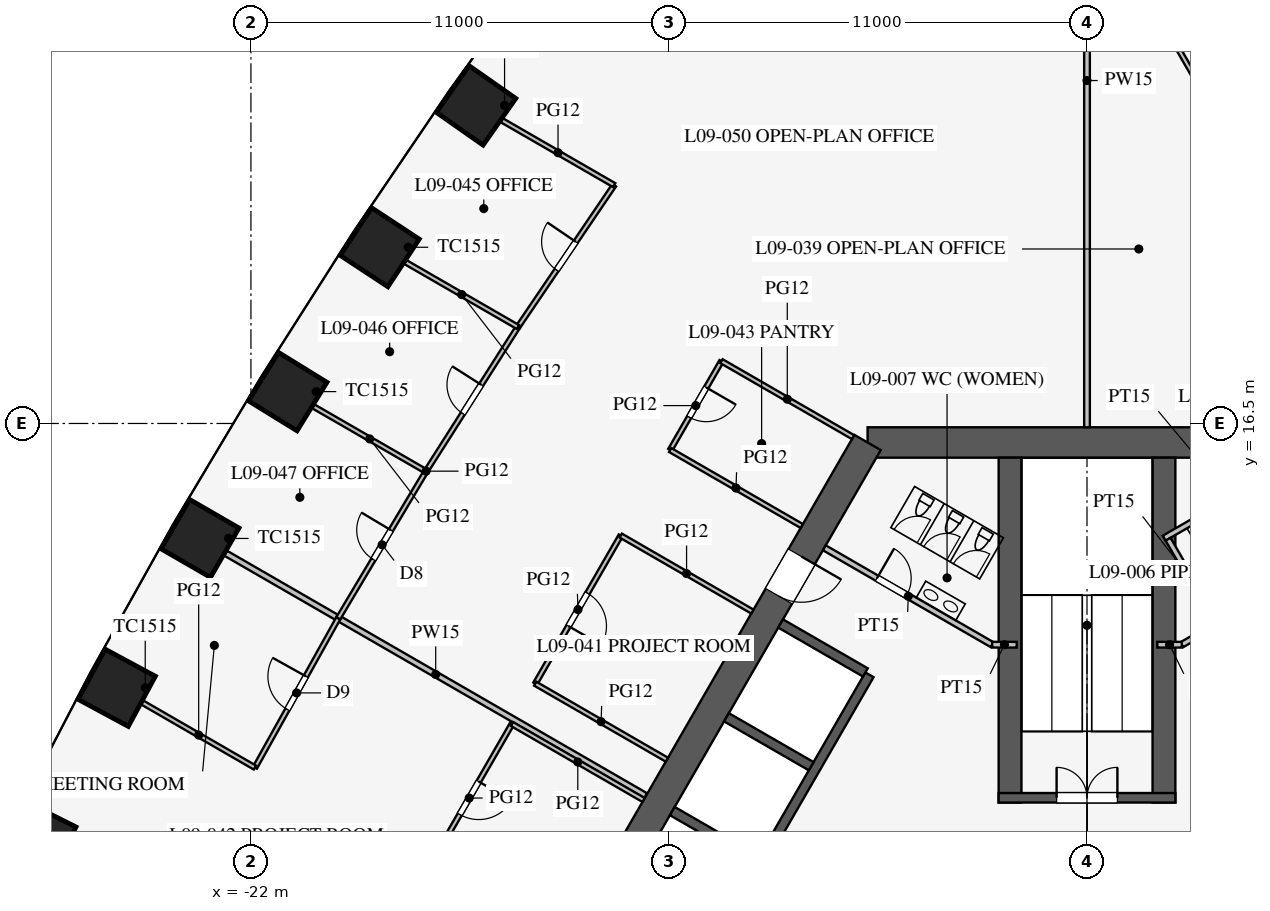
"""IFC4 building model, lengths in metres.
Left out: names, types, materials, properties, quantities, classifications, styles, units other than length and angle.
Written with IfcOpenShell. Run it as: python <this file> out.ifc"""

import sys

from ifc_helpers import new_model, si_unit, direction, frame, frame_2d, origin, origin_2d, place, context, subcontext, project, spatial, rectangle, extrude, element, fill, save


model = new_model("IFC4")
c1 = context("Model", 3, precision=1e-05, world=origin(), true_north=direction((0.0, 1.0)))
c2 = subcontext(c1, "Body", "Model", "MODEL_VIEW")
j1 = project(units=[si_unit("LENGTHUNIT", "METRE"), si_unit("PLANEANGLEUNIT", "RADIAN")], contexts=[c1])
p1 = place(None, origin())
s1 = spatial("IfcSite", under=j1, at=p1, CompositionType="ELEMENT")
p2 = place(p1, origin())
s2 = spatial("IfcBuilding", under=s1, at=p2, CompositionType="ELEMENT")
p3 = place(p2, frame((0.0, 0.0, 41.7)))
s3 = spatial("IfcBuildingStorey", under=s2, at=p3, CompositionType="ELEMENT", Elevation=41.7)
for number, where, z_axis, x_axis in (
    (1, (-16.076, 24.87, 0.0), (0.0, 0.0, 1.0), (-0.574, -0.819, 0.0)),
    (2, (-18.611, 21.137, 0.0), (0.0, 0.0, 1.0), (-0.549, -0.836, 0.0)),
    (3, (-21.031, 17.339, 0.0), (0.0, 0.0, 1.0), (-0.525, -0.851, 0.0)),
    (4, (-23.338, 13.474, 0.0), (0.0, 0.0, 1.0), (-0.5, -0.866, 0.0)),
    (5, (-25.531, 9.544, 0.0), (0.0, 0.0, 1.0), (-0.475, -0.88, 0.0)),
    (6, (-27.611, 5.549, 0.0), (0.0, 0.0, 1.0), (-0.449, -0.894, 0.0)),
):
    element("IfcColumn", number, at=place(p3, frame(where, z_axis=z_axis, x_axis=x_axis)), inside=s3, PredefinedType="COLUMN", context=c2, shape_type="SweptSolid", body=[
        extrude(rectangle(XDim=1.5, YDim=1.5, at=origin_2d()), origin(), (0.0, 0.0, 1.0), 4.2),
    ])
p4 = place(p3, frame((5.773, 16.0, 0.0), z_axis=(0.0, 0.0, 1.0), x_axis=(-1.0, 0.0, 0.0)))
e7 = element("IfcWall", 7, at=p4, inside=s3, PredefinedType="SHEAR", context=c2, shape_type="SweptSolid", body=[
    extrude(rectangle(XDim=11.547, YDim=0.8, at=frame_2d((5.773, 0.0))), origin(), (0.0, 0.0, 1.0), 4.2),
])
p5 = place(p3, frame((-5.773, 16.0, 0.0), z_axis=(0.0, 0.0, 1.0), x_axis=(-0.500002442456, -0.866023993627, 0.0)))
e8 = element("IfcWall", 8, at=p5, inside=s3, PredefinedType="SHEAR", context=c2, shape_type="SweptSolid", body=[
    extrude(rectangle(XDim=21.939, YDim=0.8, at=frame_2d((10.97, 0.0))), origin(), (0.0, 0.0, 1.0), 4.2),
])
p6 = place(p5, frame((17.27, 0.0, 0.0)))
e9 = element("IfcOpeningElement", 9, at=p6, cuts=e8, PredefinedType="OPENING", context=c2, shape_type="SweptSolid", body=[
    extrude(rectangle(XDim=1.2, YDim=2.1, at=frame_2d((0.6, 1.05))), frame((0.0, 0.41, 0.0), z_axis=(0.0, -1.0, 0.0), x_axis=(1.0, 0.0, 0.0)), (0.0, 0.0, 1.0), 0.82),
])
p7 = place(p5, frame((3.47, 0.0, 0.0)))
e10 = element("IfcOpeningElement", 10, at=p7, cuts=e8, PredefinedType="OPENING", context=c2, shape_type="SweptSolid", body=[
    extrude(rectangle(XDim=1.2, YDim=2.1, at=frame_2d((0.6, 1.05))), frame((0.0, 0.41, 0.0), z_axis=(0.0, -1.0, 0.0), x_axis=(1.0, 0.0, 0.0)), (0.0, 0.0, 1.0), 0.82),
])
p8 = place(p3, frame((-5.724, 9.886, 0.0), z_axis=(0.0, 0.0, 1.0), x_axis=(-0.500001763848, -0.866024385424, 0.0)))
e11 = element("IfcWall", 11, at=p8, inside=s3, PredefinedType="SHEAR", context=c2, shape_type="SweptSolid", body=[
    extrude(rectangle(XDim=11.4, YDim=0.25, at=frame_2d((5.7, 0.0))), origin(), (0.0, 0.0, 1.0), 4.2),
])
p9 = place(p8, frame((6.525, 0.0, 0.0)))
e12 = element("IfcOpeningElement", 12, at=p9, cuts=e11, PredefinedType="OPENING", context=c2, shape_type="SweptSolid", body=[
    extrude(rectangle(XDim=1.2, YDim=2.2, at=frame_2d((0.6, 1.1))), frame((0.0, 0.135, 0.0), z_axis=(0.0, -1.0, 0.0), x_axis=(1.0, 0.0, 0.0)), (0.0, 0.0, 1.0), 0.27),
])
p10 = place(p8, frame((9.375, 0.0, 0.0)))
e13 = element("IfcOpeningElement", 13, at=p10, cuts=e11, PredefinedType="OPENING", context=c2, shape_type="SweptSolid", body=[
    extrude(rectangle(XDim=1.2, YDim=2.2, at=frame_2d((0.6, 1.1))), frame((0.0, 0.135, 0.0), z_axis=(0.0, -1.0, 0.0), x_axis=(1.0, 0.0, 0.0)), (0.0, 0.0, 1.0), 0.27),
])
p11 = place(p3, frame((-5.832, 9.949, 0.0), z_axis=(0.0, 0.0, 1.0), x_axis=(-0.866029291668, 0.499993265928, 0.0)))
e14 = element("IfcWall", 14, at=p11, inside=s3, PredefinedType="SHEAR", context=c2, shape_type="SweptSolid", body=[
    extrude(rectangle(XDim=2.575, YDim=0.25, at=frame_2d((1.288, 0.0))), origin(), (0.0, 0.0, 1.0), 4.2),
])
for number, where, z_axis, x_axis in (
    (15, (-7.257, 7.481, 0.0), (0.0, 0.0, 1.0), (-0.866, 0.5, 0.0)),
    (16, (-8.682, 5.012, 0.0), (0.0, 0.0, 1.0), (-0.866, 0.5, 0.0)),
):
    element("IfcWall", number, at=place(p3, frame(where, z_axis=z_axis, x_axis=x_axis)), inside=s3, PredefinedType="SHEAR", context=c2, shape_type="SweptSolid", body=[
        extrude(rectangle(XDim=2.575, YDim=0.25, at=frame_2d((1.288, 0.0))), origin(), (0.0, 0.0, 1.0), 4.2),
    ])
for number, where, z_axis, x_axis in (
    (17, (2.025, 6.525, 0.0), (0.0, 0.0, 1.0), (0.0, 1.0, 0.0)),
    (18, (-2.025, 6.525, 0.0), (0.0, 0.0, 1.0), (0.0, 1.0, 0.0)),
):
    element("IfcWall", number, at=place(p3, frame(where, z_axis=z_axis, x_axis=x_axis)), inside=s3, PredefinedType="SHEAR", context=c2, shape_type="SweptSolid", body=[
        extrude(rectangle(XDim=9.075, YDim=0.6, at=frame_2d((4.538, 0.0))), origin(), (0.0, 0.0, 1.0), 4.2),
    ])
p12 = place(p3, frame((2.325, 6.65, 0.0), z_axis=(0.0, 0.0, 1.0), x_axis=(-1.0, 0.0, 0.0)))
e19 = element("IfcWall", 19, at=p12, inside=s3, PredefinedType="SHEAR", context=c2, shape_type="SweptSolid", body=[
    extrude(rectangle(XDim=4.65, YDim=0.25, at=frame_2d((2.325, 0.0))), origin(), (0.0, 0.0, 1.0), 4.2),
])
p13 = place(p12, frame((1.525, 0.0, 0.0)))
e20 = element("IfcOpeningElement", 20, at=p13, cuts=e19, PredefinedType="OPENING", context=c2, shape_type="SweptSolid", body=[
    extrude(rectangle(XDim=1.6, YDim=2.1, at=frame_2d((0.8, 1.05))), frame((0.0, 0.135, 0.0), z_axis=(0.0, -1.0, 0.0), x_axis=(1.0, 0.0, 0.0)), (0.0, 0.0, 1.0), 0.27),
])
p14 = place(p3, frame((2.495, 10.678, 0.0), z_axis=(0.0, 0.0, 1.0), x_axis=(0.86602216432, 0.500005610874, 0.0)))
e21 = element("IfcWall", 21, at=p14, inside=s3, PredefinedType="PARTITIONING", context=c2, shape_type="SweptSolid", body=[
    extrude(rectangle(XDim=5.1, YDim=0.15, at=frame_2d((2.55, 0.0))), origin(), (0.0, 0.0, 1.0), 4.0),
])
p15 = place(p14, frame((1.3, 0.0, 0.0)))
e22 = element("IfcOpeningElement", 22, at=p15, cuts=e21, PredefinedType="OPENING", context=c2, shape_type="SweptSolid", body=[
    extrude(rectangle(XDim=0.9, YDim=2.1, at=frame_2d((0.45, 1.05))), frame((0.0, 0.085, 0.0), z_axis=(0.0, -1.0, 0.0), x_axis=(1.0, 0.0, 0.0)), (0.0, 0.0, 1.0), 0.17),
])
p16 = place(p3, frame((-2.495, 10.678, 0.0), z_axis=(0.0, 0.0, 1.0), x_axis=(-0.86602216432, 0.500005610874, 0.0)))
e23 = element("IfcWall", 23, at=p16, inside=s3, PredefinedType="PARTITIONING", context=c2, shape_type="SweptSolid", body=[
    extrude(rectangle(XDim=5.1, YDim=0.15, at=frame_2d((2.55, 0.0))), origin(), (0.0, 0.0, 1.0), 4.0),
])
p17 = place(p16, frame((2.6, 0.0, 0.0)))
e24 = element("IfcOpeningElement", 24, at=p17, cuts=e23, PredefinedType="OPENING", context=c2, shape_type="SweptSolid", body=[
    extrude(rectangle(XDim=0.9, YDim=2.1, at=frame_2d((0.45, 1.05))), frame((0.0, 0.085, 0.0), z_axis=(0.0, -1.0, 0.0), x_axis=(1.0, 0.0, 0.0)), (0.0, 0.0, 1.0), 0.17),
])
for number, where, z_axis, x_axis in (
    (25, (2.495, 10.678, 0.0), (0.0, 0.0, 1.0), (-1.0, 0.0, 0.0)),
    (26, (-2.495, 10.678, 0.0), (0.0, 0.0, 1.0), (1.0, 0.0, 0.0)),
):
    element("IfcWall", number, at=place(p3, frame(where, z_axis=z_axis, x_axis=x_axis)), inside=s3, PredefinedType="PARTITIONING", context=c2, shape_type="SweptSolid", body=[
        extrude(rectangle(XDim=0.645, YDim=0.15, at=frame_2d((0.323, 0.0))), origin(), (0.0, 0.0, 1.0), 4.0),
    ])
p18 = place(p3, frame((2.031, 13.482, 0.0), z_axis=(0.0, 0.0, 1.0), x_axis=(0.866050731258, 0.499956128963, 0.0)))
e27 = element("IfcWall", 27, at=p18, inside=s3, PredefinedType="PARTITIONING", context=c2, shape_type="SweptSolid", body=[
    extrude(rectangle(XDim=4.1, YDim=0.15, at=frame_2d((2.05, 0.0))), origin(), (0.0, 0.0, 1.0), 4.0),
])
p19 = place(p3, frame((3.389, 11.281, 0.0), z_axis=(0.0, 0.0, 1.0), x_axis=(-0.499989096993, 0.866031698547, 0.0)))
e28 = element("IfcWall", 28, at=p19, inside=s3, PredefinedType="PARTITIONING", context=c2, shape_type="SweptSolid", body=[
    extrude(rectangle(XDim=2.51, YDim=0.15, at=frame_2d((1.255, 0.0))), origin(), (0.0, 0.0, 1.0), 4.0),
])
p20 = place(p3, frame((0.0, 16.4, 0.0), z_axis=(0.0, 0.0, 1.0), x_axis=(0.0, 1.0, 0.0)))
e29 = element("IfcWall", 29, at=p20, inside=s3, PredefinedType="PARTITIONING", context=c2, shape_type="SweptSolid", body=[
    extrude(rectangle(XDim=18.25, YDim=0.15, at=frame_2d((9.125, 0.0))), origin(), (0.0, 0.0, 1.0), 2.3),
])
p21 = place(p3, frame((26.415, -15.231, 0.0), z_axis=(0.0, 0.0, 1.0), x_axis=(-0.50000091641, 0.866024874695, 0.0)))
e30 = element("IfcWall", 30, at=p21, inside=s3, PredefinedType="PARTITIONING", context=c2, shape_type="SweptSolid", body=[
    extrude(rectangle(XDim=52.796, YDim=0.12, at=frame_2d((26.398, 0.0))), origin(), (0.0, 0.0, 1.0), 2.9),
])
p22 = place(p21, frame((10.2, 0.0, 0.15)))
e31 = element("IfcOpeningElement", 31, at=p22, cuts=e30, PredefinedType="OPENING", context=c2, shape_type="SweptSolid", body=[
    extrude(rectangle(XDim=1.8, YDim=2.1, at=frame_2d((0.9, 1.05))), frame((0.0, 0.07, 0.0), z_axis=(0.0, -1.0, 0.0), x_axis=(1.0, 0.0, 0.0)), (0.0, 0.0, 1.0), 0.14),
])
p23 = place(p21, frame((40.8, 0.0, 0.15)))
e32 = element("IfcOpeningElement", 32, at=p23, cuts=e30, PredefinedType="OPENING", context=c2, shape_type="SweptSolid", body=[
    extrude(rectangle(XDim=1.8, YDim=2.1, at=frame_2d((0.9, 1.05))), frame((0.0, 0.07, 0.0), z_axis=(0.0, -1.0, 0.0), x_axis=(1.0, 0.0, 0.0)), (0.0, 0.0, 1.0), 0.14),
])
p24 = place(p3, frame((-11.613, 6.705, 0.0), z_axis=(0.0, 0.0, 1.0), x_axis=(-0.86602785495, 0.499995754432, 0.0)))
e33 = element("IfcWall", 33, at=p24, inside=s3, PredefinedType="PARTITIONING", context=c2, shape_type="SweptSolid", body=[
    extrude(rectangle(XDim=12.759, YDim=0.15, at=frame_2d((6.379, 0.0))), origin(), (0.0, 0.0, 1.0), 3.2),
])
p25 = place(p3, frame((-15.131, 8.592, 0.0), z_axis=(0.0, 0.0, 1.0), x_axis=(-0.499990139034, -0.866031096941, 0.0)))
e34 = element("IfcWall", 34, at=p25, inside=s3, PredefinedType="PARTITIONING", context=c2, shape_type="SweptSolid", body=[
    extrude(rectangle(XDim=4.5, YDim=0.12, at=frame_2d((2.25, 0.0))), origin(), (0.0, 0.0, 1.0), 2.9),
])
p26 = place(p25, frame((1.75, 0.0, 0.15)))
e35 = element("IfcOpeningElement", 35, at=p26, cuts=e34, PredefinedType="OPENING", context=c2, shape_type="SweptSolid", body=[
    extrude(rectangle(XDim=1.0, YDim=2.1, at=frame_2d((0.5, 1.05))), frame((0.0, 0.07, 0.0), z_axis=(0.0, -1.0, 0.0), x_axis=(1.0, 0.0, 0.0)), (0.0, 0.0, 1.0), 0.14),
])
p27 = place(p3, frame((-9.619, 18.14, 0.0), z_axis=(0.0, 0.0, 1.0), x_axis=(-0.499980770555, -0.866036505625, 0.0)))
e36 = element("IfcWall", 36, at=p27, inside=s3, PredefinedType="PARTITIONING", context=c2, shape_type="SweptSolid", body=[
    extrude(rectangle(XDim=2.7, YDim=0.12, at=frame_2d((1.35, 0.0))), origin(), (0.0, 0.0, 1.0), 2.9),
])
p28 = place(p27, frame((0.8, 0.0, 0.15)))
e37 = element("IfcOpeningElement", 37, at=p28, cuts=e36, PredefinedType="OPENING", context=c2, shape_type="SweptSolid", body=[
    extrude(rectangle(XDim=0.9, YDim=2.1, at=frame_2d((0.45, 1.05))), frame((0.0, 0.07, 0.0), z_axis=(0.0, -1.0, 0.0), x_axis=(1.0, 0.0, 0.0)), (0.0, 0.0, 1.0), 0.14),
])
p29 = place(p3, frame((-12.269, 13.55, 0.0), z_axis=(0.0, 0.0, 1.0), x_axis=(-0.499990139034, -0.866031096941, 0.0)))
e38 = element("IfcWall", 38, at=p29, inside=s3, PredefinedType="PARTITIONING", context=c2, shape_type="SweptSolid", body=[
    extrude(rectangle(XDim=4.5, YDim=0.12, at=frame_2d((2.25, 0.0))), origin(), (0.0, 0.0, 1.0), 2.9),
])
p30 = place(p29, frame((1.75, 0.0, 0.15)))
e39 = element("IfcOpeningElement", 39, at=p30, cuts=e38, PredefinedType="OPENING", context=c2, shape_type="SweptSolid", body=[
    extrude(rectangle(XDim=1.0, YDim=2.1, at=frame_2d((0.5, 1.05))), frame((0.0, 0.07, 0.0), z_axis=(0.0, -1.0, 0.0), x_axis=(1.0, 0.0, 0.0)), (0.0, 0.0, 1.0), 0.14),
])
for number, where, z_axis, x_axis in (
    (40, (-11.667, 6.592, 0.0), (0.0, 0.0, 1.0), (-0.866, 0.5, 0.0)),
    (41, (-11.055, 7.653, 0.0), (0.0, 0.0, 1.0), (-0.866, 0.5, 0.0)),
    (42, (-6.155, 16.14, 0.0), (0.0, 0.0, 1.0), (-0.866, 0.5, 0.0)),
    (43, (-8.805, 11.55, 0.0), (0.0, 0.0, 1.0), (-0.866, 0.5, 0.0)),
    (44, (-7.505, 13.802, 0.0), (0.0, 0.0, 1.0), (-0.866, 0.5, 0.0)),
):
    element("IfcWall", number, at=place(p3, frame(where, z_axis=z_axis, x_axis=x_axis)), inside=s3, PredefinedType="PARTITIONING", context=c2, shape_type="SweptSolid", body=[
        extrude(rectangle(XDim=4.0, YDim=0.12, at=frame_2d((2.0, 0.0))), origin(), (0.0, 0.0, 1.0), 2.9),
    ])
p31 = place(p3, frame((-19.701, 11.374, 0.0), z_axis=(0.0, 0.0, 1.0), x_axis=(-0.487415216275, -0.87317031955, 0.0)))
e45 = element("IfcWall", 45, at=p31, inside=s3, PredefinedType="PARTITIONING", context=c2, shape_type="SweptSolid", body=[
    extrude(rectangle(XDim=4.5, YDim=0.12, at=frame_2d((2.25, 0.0))), origin(), (0.0, 0.0, 1.0), 2.9),
])
p32 = place(p31, frame((1.75, 0.0, 0.15)))
e46 = element("IfcOpeningElement", 46, at=p32, cuts=e45, PredefinedType="OPENING", context=c2, shape_type="SweptSolid", body=[
    extrude(rectangle(XDim=1.0, YDim=2.1, at=frame_2d((0.5, 1.05))), frame((0.0, 0.07, 0.0), z_axis=(0.0, -1.0, 0.0), x_axis=(1.0, 0.0, 0.0)), (0.0, 0.0, 1.0), 0.14),
])
p33 = place(p3, frame((-12.441, 22.771, 0.0), z_axis=(0.0, 0.0, 1.0), x_axis=(-0.561512004239, -0.827468591002, 0.0)))
e47 = element("IfcWall", 47, at=p33, inside=s3, PredefinedType="PARTITIONING", context=c2, shape_type="SweptSolid", body=[
    extrude(rectangle(XDim=4.512, YDim=0.12, at=frame_2d((2.256, 0.0))), origin(), (0.0, 0.0, 1.0), 2.9),
])
p34 = place(p33, frame((1.8, 0.0, 0.15)))
e48 = element("IfcOpeningElement", 48, at=p34, cuts=e47, PredefinedType="OPENING", context=c2, shape_type="SweptSolid", body=[
    extrude(rectangle(XDim=0.9, YDim=2.1, at=frame_2d((0.45, 1.05))), frame((0.0, 0.07, 0.0), z_axis=(0.0, -1.0, 0.0), x_axis=(1.0, 0.0, 0.0)), (0.0, 0.0, 1.0), 0.14),
])
p35 = place(p3, frame((-17.395, 15.239, 0.0), z_axis=(0.0, 0.0, 1.0), x_axis=(-0.512483962191, -0.858696796604, 0.0)))
e49 = element("IfcWall", 49, at=p35, inside=s3, PredefinedType="PARTITIONING", context=c2, shape_type="SweptSolid", body=[
    extrude(rectangle(XDim=4.5, YDim=0.12, at=frame_2d((2.25, 0.0))), origin(), (0.0, 0.0, 1.0), 2.9),
])
p36 = place(p35, frame((1.8, 0.0, 0.15)))
e50 = element("IfcOpeningElement", 50, at=p36, cuts=e49, PredefinedType="OPENING", context=c2, shape_type="SweptSolid", body=[
    extrude(rectangle(XDim=0.9, YDim=2.1, at=frame_2d((0.45, 1.05))), frame((0.0, 0.07, 0.0), z_axis=(0.0, -1.0, 0.0), x_axis=(1.0, 0.0, 0.0)), (0.0, 0.0, 1.0), 0.14),
])
p37 = place(p3, frame((-14.975, 19.038, 0.0), z_axis=(0.0, 0.0, 1.0), x_axis=(-0.537243691336, -0.843427066272, 0.0)))
e51 = element("IfcWall", 51, at=p37, inside=s3, PredefinedType="PARTITIONING", context=c2, shape_type="SweptSolid", body=[
    extrude(rectangle(XDim=4.504, YDim=0.12, at=frame_2d((2.252, 0.0))), origin(), (0.0, 0.0, 1.0), 2.9),
])
p38 = place(p37, frame((1.8, 0.0, 0.15)))
e52 = element("IfcOpeningElement", 52, at=p38, cuts=e51, PredefinedType="OPENING", context=c2, shape_type="SweptSolid", body=[
    extrude(rectangle(XDim=0.9, YDim=2.1, at=frame_2d((0.45, 1.05))), frame((0.0, 0.07, 0.0), z_axis=(0.0, -1.0, 0.0), x_axis=(1.0, 0.0, 0.0)), (0.0, 0.0, 1.0), 0.14),
])
p39 = place(p3, frame((-21.895, 7.445, 0.0), z_axis=(0.0, 0.0, 1.0), x_axis=(-0.866015553834, 0.500017060227, 0.0)))
e53 = element("IfcWall", 53, at=p39, inside=s3, PredefinedType="PARTITIONING", context=c2, shape_type="SweptSolid", body=[
    extrude(rectangle(XDim=3.419, YDim=0.12, at=frame_2d((1.71, 0.0))), origin(), (0.0, 0.0, 1.0), 2.9),
])
p40 = place(p3, frame((-12.441, 22.771, 0.0), z_axis=(0.0, 0.0, 1.0), x_axis=(-0.866016478054, 0.500015459501, 0.0)))
e54 = element("IfcWall", 54, at=p40, inside=s3, PredefinedType="PARTITIONING", context=c2, shape_type="SweptSolid", body=[
    extrude(rectangle(XDim=3.414, YDim=0.12, at=frame_2d((1.707, 0.0))), origin(), (0.0, 0.0, 1.0), 2.9),
])
p41 = place(p3, frame((-17.395, 15.239, 0.0), z_axis=(0.0, 0.0, 1.0), x_axis=(-0.866015553834, 0.500017060227, 0.0)))
e55 = element("IfcWall", 55, at=p41, inside=s3, PredefinedType="PARTITIONING", context=c2, shape_type="SweptSolid", body=[
    extrude(rectangle(XDim=3.419, YDim=0.12, at=frame_2d((1.71, 0.0))), origin(), (0.0, 0.0, 1.0), 2.9),
])
p42 = place(p3, frame((-14.975, 19.038, 0.0), z_axis=(0.0, 0.0, 1.0), x_axis=(-0.866014265796, 0.500019291066, 0.0)))
e56 = element("IfcWall", 56, at=p42, inside=s3, PredefinedType="PARTITIONING", context=c2, shape_type="SweptSolid", body=[
    extrude(rectangle(XDim=3.417, YDim=0.12, at=frame_2d((1.708, 0.0))), origin(), (0.0, 0.0, 1.0), 2.9),
])
p43 = place(p17, frame((0.9, 0.0, 0.0), z_axis=(0.0, 0.0, 1.0), x_axis=(-1.0, 0.0, 0.0)))
e57 = element("IfcDoor", 57, at=p43, inside=s3, OperationType="SINGLE_SWING_LEFT", PredefinedType="DOOR", context=c2, shape_type="SweptSolid", body=[
    extrude(rectangle(XDim=0.9, YDim=2.1, at=frame_2d((0.45, 1.05))), frame((0.0, 0.025, 0.0), z_axis=(0.0, -1.0, 0.0), x_axis=(1.0, 0.0, 0.0)), (0.0, 0.0, 1.0), 0.05),
])
fill(e24, e57)
p44 = place(p13, frame((1.6, 0.0, 0.0), z_axis=(0.0, 0.0, 1.0), x_axis=(-1.0, 0.0, 0.0)))
e58 = element("IfcDoor", 58, at=p44, inside=s3, OperationType="DOUBLE_DOOR_SINGLE_SWING", PredefinedType="DOOR", context=c2, shape_type="SweptSolid", body=[
    extrude(rectangle(XDim=1.6, YDim=2.1, at=frame_2d((0.8, 1.05))), frame((0.0, 0.025, 0.0), z_axis=(0.0, -1.0, 0.0), x_axis=(1.0, 0.0, 0.0)), (0.0, 0.0, 1.0), 0.05),
])
fill(e20, e58)
p45 = place(p7, origin())
e59 = element("IfcDoor", 59, at=p45, inside=s3, OperationType="SINGLE_SWING_LEFT", PredefinedType="DOOR", context=c2, shape_type="SweptSolid", body=[
    extrude(rectangle(XDim=1.2, YDim=2.1, at=frame_2d((0.6, 1.05))), frame((0.0, 0.025, 0.0), z_axis=(0.0, -1.0, 0.0), x_axis=(1.0, 0.0, 0.0)), (0.0, 0.0, 1.0), 0.05),
])
fill(e10, e59)
p46 = place(p30, origin())
e60 = element("IfcDoor", 60, at=p46, inside=s3, OperationType="SINGLE_SWING_RIGHT", PredefinedType="DOOR", context=c2, shape_type="SweptSolid", body=[
    extrude(rectangle(XDim=1.0, YDim=2.1, at=frame_2d((0.5, 1.05))), frame((0.0, 0.025, 0.0), z_axis=(0.0, -1.0, 0.0), x_axis=(1.0, 0.0, 0.0)), (0.0, 0.0, 1.0), 0.05),
])
fill(e39, e60)
p47 = place(p26, origin())
e61 = element("IfcDoor", 61, at=p47, inside=s3, OperationType="SINGLE_SWING_LEFT", PredefinedType="DOOR", context=c2, shape_type="SweptSolid", body=[
    extrude(rectangle(XDim=1.0, YDim=2.1, at=frame_2d((0.5, 1.05))), frame((0.0, 0.025, 0.0), z_axis=(0.0, -1.0, 0.0), x_axis=(1.0, 0.0, 0.0)), (0.0, 0.0, 1.0), 0.05),
])
fill(e35, e61)
p48 = place(p28, origin())
e62 = element("IfcDoor", 62, at=p48, inside=s3, OperationType="SINGLE_SWING_LEFT", PredefinedType="DOOR", context=c2, shape_type="SweptSolid", body=[
    extrude(rectangle(XDim=0.9, YDim=2.1, at=frame_2d((0.45, 1.05))), frame((0.0, 0.025, 0.0), z_axis=(0.0, -1.0, 0.0), x_axis=(1.0, 0.0, 0.0)), (0.0, 0.0, 1.0), 0.05),
])
fill(e37, e62)
p49 = place(p34, frame((0.9, 0.0, 0.0), z_axis=(0.0, 0.0, 1.0), x_axis=(-1.0, 0.0, 0.0)))
e63 = element("IfcDoor", 63, at=p49, inside=s3, OperationType="SINGLE_SWING_RIGHT", PredefinedType="DOOR", context=c2, shape_type="SweptSolid", body=[
    extrude(rectangle(XDim=0.9, YDim=2.1, at=frame_2d((0.45, 1.05))), frame((0.0, 0.025, 0.0), z_axis=(0.0, -1.0, 0.0), x_axis=(1.0, 0.0, 0.0)), (0.0, 0.0, 1.0), 0.05),
])
fill(e48, e63)
p50 = place(p38, frame((0.9, 0.0, 0.0), z_axis=(0.0, 0.0, 1.0), x_axis=(-1.0, 0.0, 0.0)))
e64 = element("IfcDoor", 64, at=p50, inside=s3, OperationType="SINGLE_SWING_RIGHT", PredefinedType="DOOR", context=c2, shape_type="SweptSolid", body=[
    extrude(rectangle(XDim=0.9, YDim=2.1, at=frame_2d((0.45, 1.05))), frame((0.0, 0.025, 0.0), z_axis=(0.0, -1.0, 0.0), x_axis=(1.0, 0.0, 0.0)), (0.0, 0.0, 1.0), 0.05),
])
fill(e52, e64)
p51 = place(p36, frame((0.9, 0.0, 0.0), z_axis=(0.0, 0.0, 1.0), x_axis=(-1.0, 0.0, 0.0)))
e65 = element("IfcDoor", 65, at=p51, inside=s3, OperationType="SINGLE_SWING_RIGHT", PredefinedType="DOOR", context=c2, shape_type="SweptSolid", body=[
    extrude(rectangle(XDim=0.9, YDim=2.1, at=frame_2d((0.45, 1.05))), frame((0.0, 0.025, 0.0), z_axis=(0.0, -1.0, 0.0), x_axis=(1.0, 0.0, 0.0)), (0.0, 0.0, 1.0), 0.05),
])
fill(e50, e65)
p52 = place(p32, frame((1.0, 0.0, 0.0), z_axis=(0.0, 0.0, 1.0), x_axis=(-1.0, 0.0, 0.0)))
e66 = element("IfcDoor", 66, at=p52, inside=s3, OperationType="SINGLE_SWING_RIGHT", PredefinedType="DOOR", context=c2, shape_type="SweptSolid", body=[
    extrude(rectangle(XDim=1.0, YDim=2.1, at=frame_2d((0.5, 1.05))), frame((0.0, 0.025, 0.0), z_axis=(0.0, -1.0, 0.0), x_axis=(1.0, 0.0, 0.0)), (0.0, 0.0, 1.0), 0.05),
])
fill(e46, e66)
save(model, sys.argv[1])
